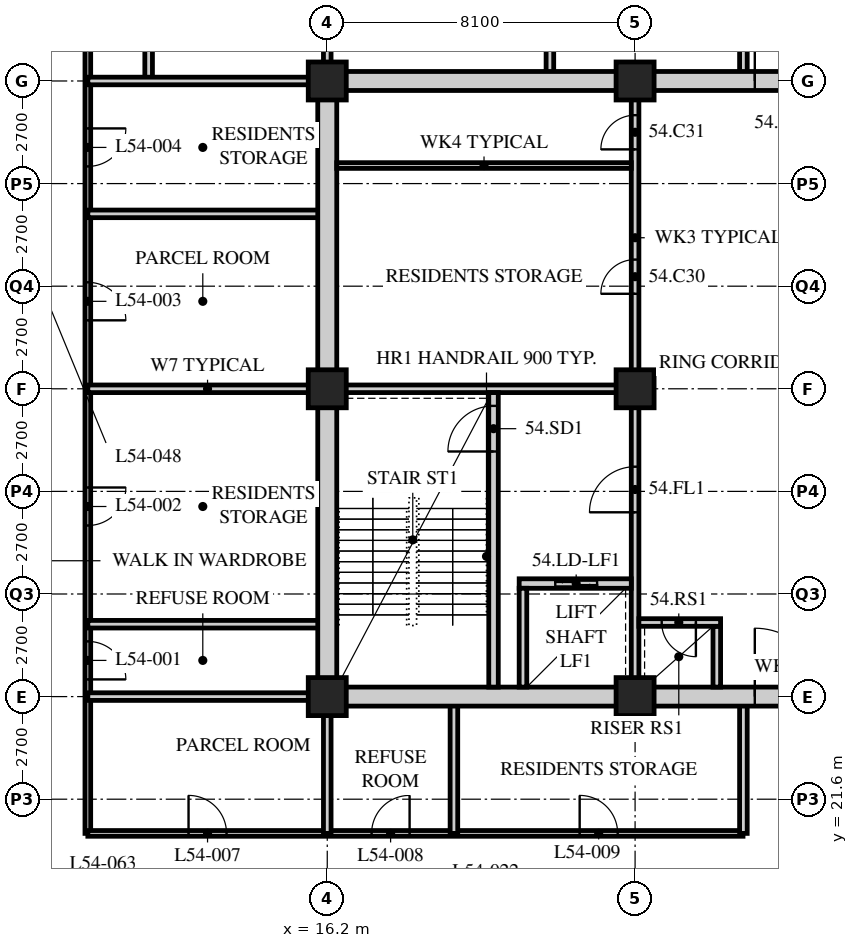
"""IFC4 building model, lengths in metres.
Left out: names, types, materials, properties, quantities, classifications, styles, units other than length and angle.
Written with IfcOpenShell. Run it as: python <this file> out.ifc"""

import sys

from ifc_helpers import new_model, si_unit, direction, frame, frame_2d, origin, origin_2d, place, context, subcontext, project, spatial, rectangle, hollow_rectangle, extrude, element, fill, save


model = new_model("IFC4")
c1 = context("Model", 3, precision=1e-05, world=origin(), true_north=direction((0.0, 1.0)))
c2 = subcontext(c1, "Body", "Model", "MODEL_VIEW")
j1 = project(units=[si_unit("LENGTHUNIT", "METRE"), si_unit("PLANEANGLEUNIT", "RADIAN")], contexts=[c1])
p1 = place(None, origin())
s1 = spatial("IfcSite", under=j1, at=p1, CompositionType="ELEMENT")
p2 = place(p1, origin())
s2 = spatial("IfcBuilding", under=s1, at=p2, CompositionType="ELEMENT")
p3 = place(p2, frame((0.0, 0.0, 210.0)))
s3 = spatial("IfcBuildingStorey", under=s2, at=p3, CompositionType="ELEMENT", Elevation=210.0)
for number, where, z_axis, x_axis in (
    (1, (16.2, 24.3, 0.0), (0.0, 0.0, 1.0), (1.0, 0.0, 0.0)),
    (2, (16.2, 32.4, 0.0), (0.0, 0.0, 1.0), (1.0, 0.0, 0.0)),
    (3, (16.2, 40.5, 0.0), (0.0, 0.0, 1.0), (1.0, 0.0, 0.0)),
    (4, (24.3, 24.3, 0.0), (0.0, 0.0, 1.0), (1.0, 0.0, 0.0)),
    (5, (24.3, 32.4, 0.0), (0.0, 0.0, 1.0), (1.0, 0.0, 0.0)),
    (6, (24.3, 40.5, 0.0), (0.0, 0.0, 1.0), (1.0, 0.0, 0.0)),
):
    element("IfcColumn", number, at=place(p3, frame(where, z_axis=z_axis, x_axis=x_axis)), inside=s3, PredefinedType="COLUMN", context=c2, shape_type="SweptSolid", body=[
        extrude(hollow_rectangle(XDim=1.0, YDim=1.0, WallThickness=0.1, at=origin_2d()), origin(), (0.0, 0.0, 1.0), 3.6),
    ])
p4 = place(p3, frame((9.9, 45.45, 0.0), z_axis=(0.0, 0.0, 1.0), x_axis=(0.0, -1.0, 0.0)))
e7 = element("IfcWall", 7, at=p4, inside=s3, PredefinedType="PARTITIONING", context=c2, shape_type="SweptSolid", body=[
    extrude(rectangle(XDim=24.75, YDim=0.15, at=frame_2d((12.375, 0.0))), origin(), (0.0, 0.0, 1.0), 3.39),
])
p5 = place(p4, frame((19.698, 0.0, 0.0)))
e8 = element("IfcOpeningElement", 8, at=p5, cuts=e7, PredefinedType="OPENING", context=c2, shape_type="SweptSolid", body=[
    extrude(rectangle(XDim=1.0, YDim=2.1, at=frame_2d((0.5, 1.05))), frame((0.0, 0.085, 0.0), z_axis=(0.0, -1.0, 0.0), x_axis=(1.0, 0.0, 0.0)), (0.0, 0.0, 1.0), 0.17),
])
p6 = place(p4, frame((15.648, 0.0, 0.0)))
e9 = element("IfcOpeningElement", 9, at=p6, cuts=e7, PredefinedType="OPENING", context=c2, shape_type="SweptSolid", body=[
    extrude(rectangle(XDim=1.0, YDim=2.1, at=frame_2d((0.5, 1.05))), frame((0.0, 0.085, 0.0), z_axis=(0.0, -1.0, 0.0), x_axis=(1.0, 0.0, 0.0)), (0.0, 0.0, 1.0), 0.17),
])
p7 = place(p4, frame((10.248, 0.0, 0.0)))
e10 = element("IfcOpeningElement", 10, at=p7, cuts=e7, PredefinedType="OPENING", context=c2, shape_type="SweptSolid", body=[
    extrude(rectangle(XDim=1.0, YDim=2.1, at=frame_2d((0.5, 1.05))), frame((0.0, 0.085, 0.0), z_axis=(0.0, -1.0, 0.0), x_axis=(1.0, 0.0, 0.0)), (0.0, 0.0, 1.0), 0.17),
])
p8 = place(p4, frame((6.198, 0.0, 0.0)))
e11 = element("IfcOpeningElement", 11, at=p8, cuts=e7, PredefinedType="OPENING", context=c2, shape_type="SweptSolid", body=[
    extrude(rectangle(XDim=1.0, YDim=2.1, at=frame_2d((0.5, 1.05))), frame((0.0, 0.085, 0.0), z_axis=(0.0, -1.0, 0.0), x_axis=(1.0, 0.0, 0.0)), (0.0, 0.0, 1.0), 0.17),
])
p9 = place(p3, frame((9.9, 20.7, 0.0), z_axis=(0.0, 0.0, 1.0), x_axis=(1.0, 0.0, 0.0)))
e12 = element("IfcWall", 12, at=p9, inside=s3, PredefinedType="PARTITIONING", context=c2, shape_type="SweptSolid", body=[
    extrude(rectangle(XDim=17.24, YDim=0.15, at=frame_2d((8.62, 0.0))), origin(), (0.0, 0.0, 1.0), 3.39),
])
p10 = place(p9, frame((2.65, 0.0, 0.0)))
e13 = element("IfcOpeningElement", 13, at=p10, cuts=e12, PredefinedType="OPENING", context=c2, shape_type="SweptSolid", body=[
    extrude(rectangle(XDim=1.0, YDim=2.1, at=frame_2d((0.5, 1.05))), frame((0.0, 0.085, 0.0), z_axis=(0.0, -1.0, 0.0), x_axis=(1.0, 0.0, 0.0)), (0.0, 0.0, 1.0), 0.17),
])
p11 = place(p9, frame((7.467, 0.0, 0.0)))
e14 = element("IfcOpeningElement", 14, at=p11, cuts=e12, PredefinedType="OPENING", context=c2, shape_type="SweptSolid", body=[
    extrude(rectangle(XDim=1.0, YDim=2.1, at=frame_2d((0.5, 1.05))), frame((0.0, 0.085, 0.0), z_axis=(0.0, -1.0, 0.0), x_axis=(1.0, 0.0, 0.0)), (0.0, 0.0, 1.0), 0.17),
])
p12 = place(p9, frame((12.942, 0.0, 0.0)))
e15 = element("IfcOpeningElement", 15, at=p12, cuts=e12, PredefinedType="OPENING", context=c2, shape_type="SweptSolid", body=[
    extrude(rectangle(XDim=1.0, YDim=2.1, at=frame_2d((0.5, 1.05))), frame((0.0, 0.085, 0.0), z_axis=(0.0, -1.0, 0.0), x_axis=(1.0, 0.0, 0.0)), (0.0, 0.0, 1.0), 0.17),
])
for number, where, z_axis, x_axis in (
    (16, (9.9, 32.4, 0.0), (0.0, 0.0, 1.0), (1.0, 0.0, 0.0)),
    (17, (9.9, 26.205, 0.0), (0.0, 0.0, 1.0), (1.0, 0.0, 0.0)),
    (18, (9.9, 37.003, 0.0), (0.0, 0.0, 1.0), (1.0, 0.0, 0.0)),
):
    element("IfcWall", number, at=place(p3, frame(where, z_axis=z_axis, x_axis=x_axis)), inside=s3, PredefinedType="SOLIDWALL", context=c2, shape_type="SweptSolid", body=[
        extrude(rectangle(XDim=6.3, YDim=0.2, at=frame_2d((3.15, 0.0))), origin(), (0.0, 0.0, 1.0), 3.39),
    ])
p13 = place(p3, frame((16.2, 20.7, 0.0), z_axis=(0.0, 0.0, 1.0), x_axis=(0.0, 1.0, 0.0)))
e19 = element("IfcWall", 19, at=p13, inside=s3, PredefinedType="SOLIDWALL", context=c2, shape_type="SweptSolid", body=[
    extrude(rectangle(XDim=3.6, YDim=0.2, at=frame_2d((1.8, 0.0))), origin(), (0.0, 0.0, 1.0), 2.778),
])
for number, where, z_axis, x_axis in (
    (20, (19.533, 20.7, 0.0), (0.0, 0.0, 1.0), (0.0, 1.0, 0.0)),
    (21, (27.15, 20.7, 0.0), (0.0, 0.0, 1.0), (0.0, 1.0, 0.0)),
):
    element("IfcWall", number, at=place(p3, frame(where, z_axis=z_axis, x_axis=x_axis)), inside=s3, PredefinedType="SOLIDWALL", context=c2, shape_type="SweptSolid", body=[
        extrude(rectangle(XDim=3.6, YDim=0.2, at=frame_2d((1.8, 0.0))), origin(), (0.0, 0.0, 1.0), 3.39),
    ])
p14 = place(p3, frame((16.2, 40.5, 0.0), z_axis=(0.0, 0.0, 1.0), x_axis=(0.0, 1.0, 0.0)))
e22 = element("IfcWall", 22, at=p14, inside=s3, PredefinedType="SOLIDWALL", context=c2, shape_type="SweptSolid", body=[
    extrude(rectangle(XDim=4.95, YDim=0.2, at=frame_2d((2.475, 0.0))), origin(), (0.0, 0.0, 1.0), 2.69),
])
for number, where, z_axis, x_axis in (
    (23, (11.5, 45.45, 0.0), (0.0, 0.0, 1.0), (0.0, -1.0, 0.0)),
    (24, (22.059, 45.45, 0.0), (0.0, 0.0, 1.0), (0.0, -1.0, 0.0)),
    (25, (27.15, 40.5, 0.0), (0.0, 0.0, 1.0), (0.0, 1.0, 0.0)),
):
    element("IfcWall", number, at=place(p3, frame(where, z_axis=z_axis, x_axis=x_axis)), inside=s3, PredefinedType="SOLIDWALL", context=c2, shape_type="SweptSolid", body=[
        extrude(rectangle(XDim=4.95, YDim=0.2, at=frame_2d((2.475, 0.0))), origin(), (0.0, 0.0, 1.0), 3.39),
    ])
for number, where, z_axis, x_axis in (
    (26, (9.9, 24.3, 0.0), (0.0, 0.0, 1.0), (1.0, 0.0, 0.0)),
    (27, (9.9, 40.5, 0.0), (0.0, 0.0, 1.0), (1.0, 0.0, 0.0)),
):
    element("IfcWall", number, at=place(p3, frame(where, z_axis=z_axis, x_axis=x_axis)), inside=s3, PredefinedType="SOLIDWALL", context=c2, shape_type="SweptSolid", body=[
        extrude(rectangle(XDim=6.3, YDim=0.2, at=frame_2d((3.15, 0.0))), origin(), (0.0, 0.0, 1.0), 3.39),
    ])
p15 = place(p3, frame((15.95, 24.3, 0.0), z_axis=(0.0, 0.0, 1.0), x_axis=(1.0, 0.0, 0.0)))
e28 = element("IfcWall", 28, at=p15, inside=s3, PredefinedType="SOLIDWALL", context=c2, shape_type="SweptSolid", body=[
    extrude(rectangle(XDim=24.8, YDim=0.5, at=frame_2d((12.4, 0.0))), origin(), (0.0, 0.0, 1.0), 2.74),
])
p16 = place(p15, frame((11.5, 0.0, 0.0)))
e29 = element("IfcOpeningElement", 29, at=p16, cuts=e28, PredefinedType="OPENING", context=c2, shape_type="SweptSolid", body=[
    extrude(rectangle(XDim=1.8, YDim=2.4, at=frame_2d((0.9, 1.2))), frame((0.0, 0.26, 0.0), z_axis=(0.0, -1.0, 0.0), x_axis=(1.0, 0.0, 0.0)), (0.0, 0.0, 1.0), 0.52),
])
p17 = place(p3, frame((15.95, 40.5, 0.0), z_axis=(0.0, 0.0, 1.0), x_axis=(1.0, 0.0, 0.0)))
e30 = element("IfcWall", 30, at=p17, inside=s3, PredefinedType="SOLIDWALL", context=c2, shape_type="SweptSolid", body=[
    extrude(rectangle(XDim=24.8, YDim=0.5, at=frame_2d((12.4, 0.0))), origin(), (0.0, 0.0, 1.0), 2.74),
])
p18 = place(p17, frame((11.5, 0.0, 0.0)))
e31 = element("IfcOpeningElement", 31, at=p18, cuts=e30, PredefinedType="OPENING", context=c2, shape_type="SweptSolid", body=[
    extrude(rectangle(XDim=1.8, YDim=2.4, at=frame_2d((0.9, 1.2))), frame((0.0, 0.26, 0.0), z_axis=(0.0, -1.0, 0.0), x_axis=(1.0, 0.0, 0.0)), (0.0, 0.0, 1.0), 0.52),
])
p19 = place(p3, frame((16.2, 24.55, 0.0), z_axis=(0.0, 0.0, 1.0), x_axis=(0.0, 1.0, 0.0)))
e32 = element("IfcWall", 32, at=p19, inside=s3, PredefinedType="SOLIDWALL", context=c2, shape_type="SweptSolid", body=[
    extrude(rectangle(XDim=15.7, YDim=0.5, at=frame_2d((7.85, 0.0))), origin(), (0.0, 0.0, 1.0), 2.778),
])
p20 = place(p3, frame((16.45, 32.4, 0.0), z_axis=(0.0, 0.0, 1.0), x_axis=(1.0, 0.0, 0.0)))
e33 = element("IfcWall", 33, at=p20, inside=s3, PredefinedType="SOLIDWALL", context=c2, shape_type="SweptSolid", body=[
    extrude(rectangle(XDim=7.95, YDim=0.2, at=frame_2d((3.975, 0.0))), origin(), (0.0, 0.0, 1.0), 2.778),
])
p21 = place(p3, frame((24.3, 24.55, 0.0), z_axis=(0.0, 0.0, 1.0), x_axis=(0.0, 1.0, 0.0)))
e34 = element("IfcWall", 34, at=p21, inside=s3, PredefinedType="SOLIDWALL", context=c2, shape_type="SweptSolid", body=[
    extrude(rectangle(XDim=7.75, YDim=0.2, at=frame_2d((3.875, 0.0))), origin(), (0.0, 0.0, 1.0), 2.778),
])
p22 = place(p21, frame((4.6, 0.0, 0.0)))
e35 = element("IfcOpeningElement", 35, at=p22, cuts=e34, PredefinedType="OPENING", context=c2, shape_type="SweptSolid", body=[
    extrude(rectangle(XDim=1.2, YDim=2.1, at=frame_2d((0.6, 1.05))), frame((0.0, 0.11, 0.0), z_axis=(0.0, -1.0, 0.0), x_axis=(1.0, 0.0, 0.0)), (0.0, 0.0, 1.0), 0.22),
])
p23 = place(p3, frame((20.575, 24.55, 0.0), z_axis=(0.0, 0.0, 1.0), x_axis=(0.0, 1.0, 0.0)))
e36 = element("IfcWall", 36, at=p23, inside=s3, PredefinedType="SOLIDWALL", context=c2, shape_type="SweptSolid", body=[
    extrude(rectangle(XDim=7.75, YDim=0.25, at=frame_2d((3.875, 0.0))), origin(), (0.0, 0.0, 1.0), 3.39),
])
p24 = place(p23, frame((6.2, 0.0, 0.0)))
e37 = element("IfcOpeningElement", 37, at=p24, cuts=e36, PredefinedType="OPENING", context=c2, shape_type="SweptSolid", body=[
    extrude(rectangle(XDim=1.2, YDim=2.1, at=frame_2d((0.6, 1.05))), frame((0.0, 0.135, 0.0), z_axis=(0.0, -1.0, 0.0), x_axis=(1.0, 0.0, 0.0)), (0.0, 0.0, 1.0), 0.27),
])
p25 = place(p3, frame((21.25, 27.275, 0.0), z_axis=(0.0, 0.0, 1.0), x_axis=(1.0, 0.0, 0.0)))
e38 = element("IfcWall", 38, at=p25, inside=s3, PredefinedType="SOLIDWALL", context=c2, shape_type="SweptSolid", body=[
    extrude(rectangle(XDim=2.95, YDim=0.25, at=frame_2d((1.475, 0.0))), origin(), (0.0, 0.0, 1.0), 3.39),
])
p26 = place(p25, frame((0.95, 0.0, 0.0)))
e39 = element("IfcOpeningElement", 39, at=p26, cuts=e38, PredefinedType="OPENING", context=c2, shape_type="SweptSolid", body=[
    extrude(rectangle(XDim=1.1, YDim=2.4, at=frame_2d((0.55, 1.2))), frame((0.0, 0.135, 0.0), z_axis=(0.0, -1.0, 0.0), x_axis=(1.0, 0.0, 0.0)), (0.0, 0.0, 1.0), 0.27),
])
p27 = place(p3, frame((21.35, 24.55, 0.0), z_axis=(0.0, 0.0, 1.0), x_axis=(0.0, 1.0, 0.0)))
e40 = element("IfcWall", 40, at=p27, inside=s3, PredefinedType="SOLIDWALL", context=c2, shape_type="SweptSolid", body=[
    extrude(rectangle(XDim=2.6, YDim=0.2, at=frame_2d((1.3, 0.0))), origin(), (0.0, 0.0, 1.0), 3.39),
])
p28 = place(p3, frame((26.45, 24.55, 0.0), z_axis=(0.0, 0.0, 1.0), x_axis=(0.0, 1.0, 0.0)))
e41 = element("IfcWall", 41, at=p28, inside=s3, PredefinedType="SOLIDWALL", context=c2, shape_type="SweptSolid", body=[
    extrude(rectangle(XDim=1.6, YDim=0.2, at=frame_2d((0.8, 0.0))), origin(), (0.0, 0.0, 1.0), 3.39),
])
p29 = place(p3, frame((24.4, 26.25, 0.0), z_axis=(0.0, 0.0, 1.0), x_axis=(1.0, 0.0, 0.0)))
e42 = element("IfcWall", 42, at=p29, inside=s3, PredefinedType="SOLIDWALL", context=c2, shape_type="SweptSolid", body=[
    extrude(rectangle(XDim=2.15, YDim=0.2, at=frame_2d((1.075, 0.0))), origin(), (0.0, 0.0, 1.0), 3.39),
])
p30 = place(p29, frame((0.6, 0.0, 0.0)))
e43 = element("IfcOpeningElement", 43, at=p30, cuts=e42, PredefinedType="OPENING", context=c2, shape_type="SweptSolid", body=[
    extrude(rectangle(XDim=0.9, YDim=2.1, at=frame_2d((0.45, 1.05))), frame((0.0, 0.11, 0.0), z_axis=(0.0, -1.0, 0.0), x_axis=(1.0, 0.0, 0.0)), (0.0, 0.0, 1.0), 0.22),
])
p31 = place(p3, frame((24.3, 32.5, 0.0), z_axis=(0.0, 0.0, 1.0), x_axis=(0.0, 1.0, 0.0)))
e44 = element("IfcWall", 44, at=p31, inside=s3, PredefinedType="PARTITIONING", context=c2, shape_type="SweptSolid", body=[
    extrude(rectangle(XDim=7.75, YDim=0.2, at=frame_2d((3.875, 0.0))), origin(), (0.0, 0.0, 1.0), 2.778),
])
p32 = place(p31, frame((2.4, 0.0, 0.0)))
e45 = element("IfcOpeningElement", 45, at=p32, cuts=e44, PredefinedType="OPENING", context=c2, shape_type="SweptSolid", body=[
    extrude(rectangle(XDim=0.9, YDim=2.1, at=frame_2d((0.45, 1.05))), frame((0.0, 0.11, 0.0), z_axis=(0.0, -1.0, 0.0), x_axis=(1.0, 0.0, 0.0)), (0.0, 0.0, 1.0), 0.22),
])
p33 = place(p31, frame((6.2, 0.0, 0.0)))
e46 = element("IfcOpeningElement", 46, at=p33, cuts=e44, PredefinedType="OPENING", context=c2, shape_type="SweptSolid", body=[
    extrude(rectangle(XDim=0.9, YDim=2.1, at=frame_2d((0.45, 1.05))), frame((0.0, 0.11, 0.0), z_axis=(0.0, -1.0, 0.0), x_axis=(1.0, 0.0, 0.0)), (0.0, 0.0, 1.0), 0.22),
])
p34 = place(p3, frame((16.45, 38.275, 0.0), z_axis=(0.0, 0.0, 1.0), x_axis=(1.0, 0.0, 0.0)))
e47 = element("IfcWall", 47, at=p34, inside=s3, PredefinedType="PARTITIONING", context=c2, shape_type="SweptSolid", body=[
    extrude(rectangle(XDim=7.75, YDim=0.15, at=frame_2d((3.875, 0.0))), origin(), (0.0, 0.0, 1.0), 3.39),
])
p35 = place(p5, origin())
e48 = element("IfcDoor", 48, at=p35, inside=s3, OperationType="SINGLE_SWING_RIGHT", PredefinedType="DOOR", context=c2, shape_type="SweptSolid", body=[
    extrude(rectangle(XDim=1.0, YDim=2.1, at=frame_2d((0.5, 1.05))), frame((0.0, 0.025, 0.0), z_axis=(0.0, -1.0, 0.0), x_axis=(1.0, 0.0, 0.0)), (0.0, 0.0, 1.0), 0.05),
])
fill(e8, e48)
p36 = place(p6, origin())
e49 = element("IfcDoor", 49, at=p36, inside=s3, OperationType="SINGLE_SWING_LEFT", PredefinedType="DOOR", context=c2, shape_type="SweptSolid", body=[
    extrude(rectangle(XDim=1.0, YDim=2.1, at=frame_2d((0.5, 1.05))), frame((0.0, 0.025, 0.0), z_axis=(0.0, -1.0, 0.0), x_axis=(1.0, 0.0, 0.0)), (0.0, 0.0, 1.0), 0.05),
])
fill(e9, e49)
p37 = place(p7, origin())
e50 = element("IfcDoor", 50, at=p37, inside=s3, OperationType="SINGLE_SWING_RIGHT", PredefinedType="DOOR", context=c2, shape_type="SweptSolid", body=[
    extrude(rectangle(XDim=1.0, YDim=2.1, at=frame_2d((0.5, 1.05))), frame((0.0, 0.025, 0.0), z_axis=(0.0, -1.0, 0.0), x_axis=(1.0, 0.0, 0.0)), (0.0, 0.0, 1.0), 0.05),
])
fill(e10, e50)
p38 = place(p8, origin())
e51 = element("IfcDoor", 51, at=p38, inside=s3, OperationType="SINGLE_SWING_LEFT", PredefinedType="DOOR", context=c2, shape_type="SweptSolid", body=[
    extrude(rectangle(XDim=1.0, YDim=2.1, at=frame_2d((0.5, 1.05))), frame((0.0, 0.025, 0.0), z_axis=(0.0, -1.0, 0.0), x_axis=(1.0, 0.0, 0.0)), (0.0, 0.0, 1.0), 0.05),
])
fill(e11, e51)
p39 = place(p10, origin())
e52 = element("IfcDoor", 52, at=p39, inside=s3, OperationType="SINGLE_SWING_LEFT", PredefinedType="DOOR", context=c2, shape_type="SweptSolid", body=[
    extrude(rectangle(XDim=1.0, YDim=2.1, at=frame_2d((0.5, 1.05))), frame((0.0, 0.025, 0.0), z_axis=(0.0, -1.0, 0.0), x_axis=(1.0, 0.0, 0.0)), (0.0, 0.0, 1.0), 0.05),
])
fill(e13, e52)
p40 = place(p11, origin())
e53 = element("IfcDoor", 53, at=p40, inside=s3, OperationType="SINGLE_SWING_RIGHT", PredefinedType="DOOR", context=c2, shape_type="SweptSolid", body=[
    extrude(rectangle(XDim=1.0, YDim=2.1, at=frame_2d((0.5, 1.05))), frame((0.0, 0.025, 0.0), z_axis=(0.0, -1.0, 0.0), x_axis=(1.0, 0.0, 0.0)), (0.0, 0.0, 1.0), 0.05),
])
fill(e14, e53)
p41 = place(p12, origin())
e54 = element("IfcDoor", 54, at=p41, inside=s3, OperationType="SINGLE_SWING_LEFT", PredefinedType="DOOR", context=c2, shape_type="SweptSolid", body=[
    extrude(rectangle(XDim=1.0, YDim=2.1, at=frame_2d((0.5, 1.05))), frame((0.0, 0.025, 0.0), z_axis=(0.0, -1.0, 0.0), x_axis=(1.0, 0.0, 0.0)), (0.0, 0.0, 1.0), 0.05),
])
fill(e15, e54)
p42 = place(p32, origin())
e55 = element("IfcDoor", 55, at=p42, inside=s3, OperationType="SINGLE_SWING_LEFT", PredefinedType="DOOR", context=c2, shape_type="SweptSolid", body=[
    extrude(rectangle(XDim=0.9, YDim=2.1, at=frame_2d((0.45, 1.05))), frame((0.0, 0.025, 0.0), z_axis=(0.0, -1.0, 0.0), x_axis=(1.0, 0.0, 0.0)), (0.0, 0.0, 1.0), 0.05),
])
fill(e45, e55)
p43 = place(p33, origin())
e56 = element("IfcDoor", 56, at=p43, inside=s3, OperationType="SINGLE_SWING_LEFT", PredefinedType="DOOR", context=c2, shape_type="SweptSolid", body=[
    extrude(rectangle(XDim=0.9, YDim=2.1, at=frame_2d((0.45, 1.05))), frame((0.0, 0.025, 0.0), z_axis=(0.0, -1.0, 0.0), x_axis=(1.0, 0.0, 0.0)), (0.0, 0.0, 1.0), 0.05),
])
fill(e46, e56)
p44 = place(p24, origin())
e57 = element("IfcDoor", 57, at=p44, inside=s3, OperationType="SINGLE_SWING_LEFT", PredefinedType="DOOR", context=c2, shape_type="SweptSolid", body=[
    extrude(rectangle(XDim=1.2, YDim=2.1, at=frame_2d((0.6, 1.05))), frame((0.0, 0.025, 0.0), z_axis=(0.0, -1.0, 0.0), x_axis=(1.0, 0.0, 0.0)), (0.0, 0.0, 1.0), 0.05),
])
fill(e37, e57)
p45 = place(p22, origin())
e58 = element("IfcDoor", 58, at=p45, inside=s3, OperationType="SINGLE_SWING_LEFT", PredefinedType="DOOR", context=c2, shape_type="SweptSolid", body=[
    extrude(rectangle(XDim=1.2, YDim=2.1, at=frame_2d((0.6, 1.05))), frame((0.0, 0.025, 0.0), z_axis=(0.0, -1.0, 0.0), x_axis=(1.0, 0.0, 0.0)), (0.0, 0.0, 1.0), 0.05),
])
fill(e35, e58)
p46 = place(p30, origin())
e59 = element("IfcDoor", 59, at=p46, inside=s3, OperationType="SINGLE_SWING_LEFT", PredefinedType="DOOR", context=c2, shape_type="SweptSolid", body=[
    extrude(rectangle(XDim=0.9, YDim=2.1, at=frame_2d((0.45, 1.05))), frame((0.0, 0.025, 0.0), z_axis=(0.0, -1.0, 0.0), x_axis=(1.0, 0.0, 0.0)), (0.0, 0.0, 1.0), 0.05),
])
fill(e43, e59)
p47 = place(p26, origin())
e60 = element("IfcDoor", 60, at=p47, inside=s3, OperationType="DOUBLE_DOOR_SLIDING", PredefinedType="DOOR", context=c2, shape_type="SweptSolid", body=[
    extrude(rectangle(XDim=1.1, YDim=2.4, at=frame_2d((0.55, 1.2))), frame((0.0, 0.025, 0.0), z_axis=(0.0, -1.0, 0.0), x_axis=(1.0, 0.0, 0.0)), (0.0, 0.0, 1.0), 0.05),
])
fill(e39, e60)
p48 = place(p16, origin())
e61 = element("IfcDoor", 61, at=p48, inside=s3, OperationType="DOUBLE_DOOR_SINGLE_SWING", PredefinedType="DOOR", context=c2, shape_type="SweptSolid", body=[
    extrude(rectangle(XDim=1.8, YDim=2.4, at=frame_2d((0.9, 1.2))), frame((0.0, 0.025, 0.0), z_axis=(0.0, -1.0, 0.0), x_axis=(1.0, 0.0, 0.0)), (0.0, 0.0, 1.0), 0.05),
])
fill(e29, e61)
p49 = place(p18, origin())
e62 = element("IfcDoor", 62, at=p49, inside=s3, OperationType="DOUBLE_DOOR_SINGLE_SWING", PredefinedType="DOOR", context=c2, shape_type="SweptSolid", body=[
    extrude(rectangle(XDim=1.8, YDim=2.4, at=frame_2d((0.9, 1.2))), frame((0.0, 0.025, 0.0), z_axis=(0.0, -1.0, 0.0), x_axis=(1.0, 0.0, 0.0)), (0.0, 0.0, 1.0), 0.05),
])
fill(e31, e62)
save(model, sys.argv[1])
